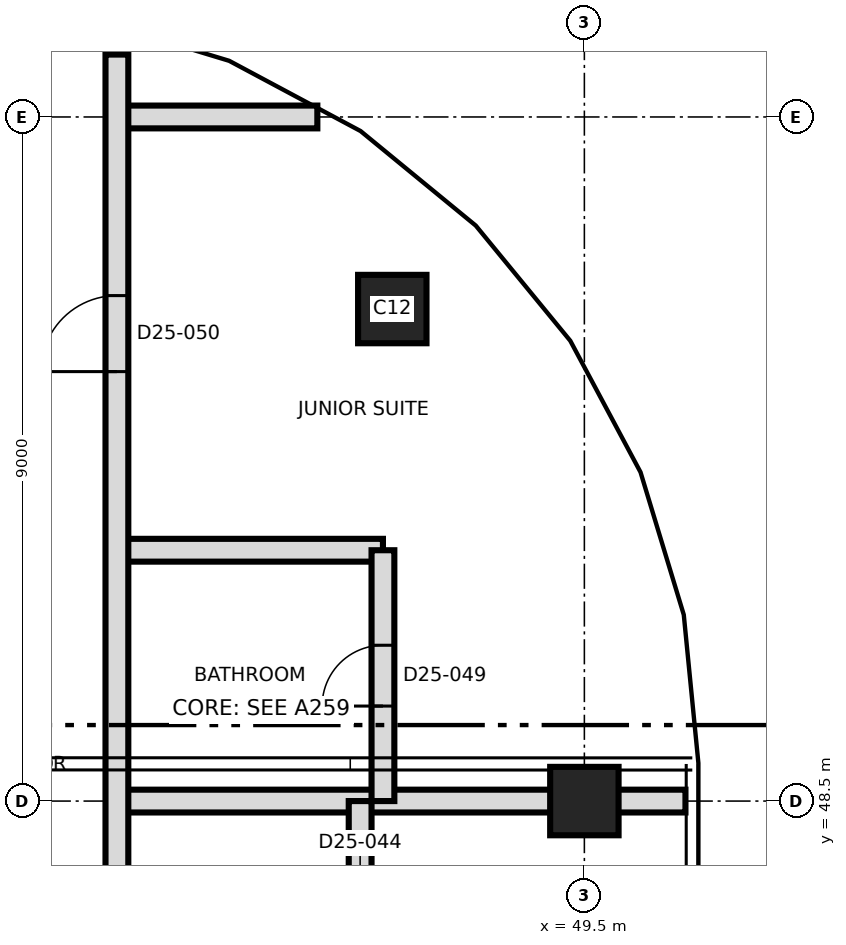
"""IFC4 building model, lengths in metres.
Left out: names, types, materials, properties, quantities, classifications, styles, units other than length and angle.
Written with IfcOpenShell. Run it as: python <this file> out.ifc"""

import sys

from ifc_helpers import new_model, si_unit, direction, frame, frame_2d, origin, origin_2d, place, context, subcontext, project, spatial, rectangle, extrude, element, fill, save


model = new_model("IFC4")
c1 = context("Model", 3, precision=1e-05, world=origin(), true_north=direction((0.0, 1.0)))
c2 = subcontext(c1, "Body", "Model", "MODEL_VIEW")
j1 = project(units=[si_unit("LENGTHUNIT", "METRE"), si_unit("PLANEANGLEUNIT", "RADIAN")], contexts=[c1])
p1 = place(None, origin())
s1 = spatial("IfcSite", under=j1, at=p1, CompositionType="ELEMENT")
p2 = place(p1, origin())
s2 = spatial("IfcBuilding", under=s1, at=p2, CompositionType="ELEMENT")
p3 = place(p2, frame((0.0, 0.0, 225.4)))
s3 = spatial("IfcBuildingStorey", under=s2, at=p3, CompositionType="ELEMENT", Elevation=225.4)
for number, where, z_axis, x_axis in (
    (1, (49.5, 48.5, 0.0), (0.0, 0.0, 1.0), (1.0, 0.0, 0.0)),
    (2, (46.973, 54.973, 0.0), (0.0, 0.0, 1.0), (1.0, 0.0, 0.0)),
):
    element("IfcColumn", number, at=place(p3, frame(where, z_axis=z_axis, x_axis=x_axis)), inside=s3, PredefinedType="COLUMN", context=c2, shape_type="SweptSolid", body=[
        extrude(rectangle(XDim=0.9, YDim=0.9, at=origin_2d()), origin(), (0.0, 0.0, 1.0), 3.7),
    ])
p4 = place(p3, frame((43.35, 48.5, 0.0), z_axis=(0.0, 0.0, 1.0), x_axis=(1.0, 0.0, 0.0)))
e3 = element("IfcWall", 3, at=p4, inside=s3, PredefinedType="PARTITIONING", context=c2, shape_type="SweptSolid", body=[
    extrude(rectangle(XDim=7.48, YDim=0.3, at=frame_2d((3.74, 0.0))), origin(), (0.0, 0.0, 1.0), 3.4),
])
p5 = place(p3, frame((43.35, 51.8, 0.0), z_axis=(0.0, 0.0, 1.0), x_axis=(1.0, 0.0, 0.0)))
e4 = element("IfcWall", 4, at=p5, inside=s3, PredefinedType="PARTITIONING", context=c2, shape_type="SweptSolid", body=[
    extrude(rectangle(XDim=3.5, YDim=0.3, at=frame_2d((1.75, 0.0))), origin(), (0.0, 0.0, 1.0), 3.4),
])
p6 = place(p3, frame((43.35, 57.5, 0.0), z_axis=(0.0, 0.0, 1.0), x_axis=(1.0, 0.0, 0.0)))
e5 = element("IfcWall", 5, at=p6, inside=s3, PredefinedType="PARTITIONING", context=c2, shape_type="SweptSolid", body=[
    extrude(rectangle(XDim=2.637, YDim=0.3, at=frame_2d((1.318, 0.0))), origin(), (0.0, 0.0, 1.0), 3.4),
])
p7 = place(p3, frame((43.35, 39.55, 0.0), z_axis=(0.0, 0.0, 1.0), x_axis=(0.0, 1.0, 0.0)))
e6 = element("IfcWall", 6, at=p7, inside=s3, PredefinedType="PARTITIONING", context=c2, shape_type="SweptSolid", body=[
    extrude(rectangle(XDim=18.771, YDim=0.3, at=frame_2d((9.385, 0.0))), origin(), (0.0, 0.0, 1.0), 3.4),
])
p8 = place(p7, frame((1.085, 0.0, 0.0)))
e7 = element("IfcOpeningElement", 7, at=p8, cuts=e6, PredefinedType="OPENING", context=c2, shape_type="SweptSolid", body=[
    extrude(rectangle(XDim=1.2, YDim=2.1, at=frame_2d((0.6, 1.05))), frame((0.0, 0.16, 0.0), z_axis=(0.0, -1.0, 0.0), x_axis=(1.0, 0.0, 0.0)), (0.0, 0.0, 1.0), 0.32),
])
p9 = place(p7, frame((4.335, 0.0, 0.0)))
e8 = element("IfcOpeningElement", 8, at=p9, cuts=e6, PredefinedType="OPENING", context=c2, shape_type="SweptSolid", body=[
    extrude(rectangle(XDim=1.0, YDim=2.1, at=frame_2d((0.5, 1.05))), frame((0.0, 0.16, 0.0), z_axis=(0.0, -1.0, 0.0), x_axis=(1.0, 0.0, 0.0)), (0.0, 0.0, 1.0), 0.32),
])
p10 = place(p7, frame((14.6, 0.0, 0.0)))
e9 = element("IfcOpeningElement", 9, at=p10, cuts=e6, PredefinedType="OPENING", context=c2, shape_type="SweptSolid", body=[
    extrude(rectangle(XDim=1.0, YDim=2.4, at=frame_2d((0.5, 1.2))), frame((0.0, 0.16, 0.0), z_axis=(0.0, -1.0, 0.0), x_axis=(1.0, 0.0, 0.0)), (0.0, 0.0, 1.0), 0.32),
])
p11 = place(p3, frame((46.55, 45.8, 0.0), z_axis=(0.0, 0.0, 1.0), x_axis=(0.0, 1.0, 0.0)))
e10 = element("IfcWall", 10, at=p11, inside=s3, PredefinedType="PARTITIONING", context=c2, shape_type="SweptSolid", body=[
    extrude(rectangle(XDim=2.7, YDim=0.3, at=frame_2d((1.35, 0.0))), origin(), (0.0, 0.0, 1.0), 3.4),
])
p12 = place(p11, frame((0.95, 0.0, 0.0)))
e11 = element("IfcOpeningElement", 11, at=p12, cuts=e10, PredefinedType="OPENING", context=c2, shape_type="SweptSolid", body=[
    extrude(rectangle(XDim=0.8, YDim=2.1, at=frame_2d((0.4, 1.05))), frame((0.0, 0.16, 0.0), z_axis=(0.0, -1.0, 0.0), x_axis=(1.0, 0.0, 0.0)), (0.0, 0.0, 1.0), 0.32),
])
p13 = place(p3, frame((46.85, 48.5, 0.0), z_axis=(0.0, 0.0, 1.0), x_axis=(0.0, 1.0, 0.0)))
e12 = element("IfcWall", 12, at=p13, inside=s3, PredefinedType="PARTITIONING", context=c2, shape_type="SweptSolid", body=[
    extrude(rectangle(XDim=3.3, YDim=0.3, at=frame_2d((1.65, 0.0))), origin(), (0.0, 0.0, 1.0), 3.4),
])
p14 = place(p13, frame((1.25, 0.0, 0.0)))
e13 = element("IfcOpeningElement", 13, at=p14, cuts=e12, PredefinedType="OPENING", context=c2, shape_type="SweptSolid", body=[
    extrude(rectangle(XDim=0.8, YDim=2.1, at=frame_2d((0.4, 1.05))), frame((0.0, 0.16, 0.0), z_axis=(0.0, -1.0, 0.0), x_axis=(1.0, 0.0, 0.0)), (0.0, 0.0, 1.0), 0.32),
])
p15 = place(p14, origin())
e14 = element("IfcDoor", 14, at=p15, inside=s3, OperationType="SINGLE_SWING_LEFT", PredefinedType="DOOR", context=c2, shape_type="SweptSolid", body=[
    extrude(rectangle(XDim=0.8, YDim=2.1, at=frame_2d((0.4, 1.05))), frame((0.0, 0.025, 0.0), z_axis=(0.0, -1.0, 0.0), x_axis=(1.0, 0.0, 0.0)), (0.0, 0.0, 1.0), 0.05),
])
fill(e13, e14)
p16 = place(p10, origin())
e15 = element("IfcDoor", 15, at=p16, inside=s3, OperationType="SINGLE_SWING_RIGHT", PredefinedType="DOOR", context=c2, shape_type="SweptSolid", body=[
    extrude(rectangle(XDim=1.0, YDim=2.4, at=frame_2d((0.5, 1.2))), frame((0.0, 0.025, 0.0), z_axis=(0.0, -1.0, 0.0), x_axis=(1.0, 0.0, 0.0)), (0.0, 0.0, 1.0), 0.05),
])
fill(e9, e15)
save(model, sys.argv[1])
